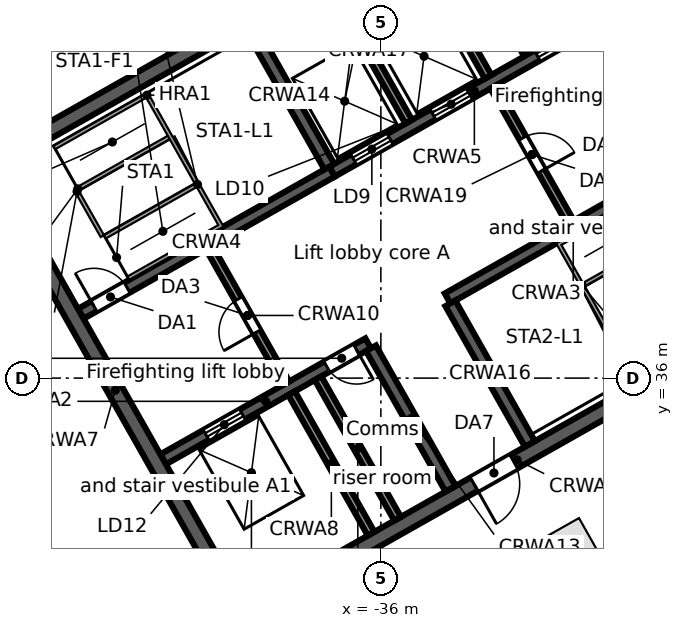
"""IFC4 building model, lengths in metres.
Left out: names, types, materials, properties, quantities, classifications, styles, units other than length and angle.
Written with IfcOpenShell. Run it as: python <this file> out.ifc"""

import sys

from ifc_helpers import new_model, si_unit, direction, frame, frame_2d, origin, origin_2d, place, context, subcontext, project, spatial, rectangle, extrude, element, fill, save


model = new_model("IFC4")
c1 = context("Model", 3, precision=1e-05, world=origin(), true_north=direction((0.0, 1.0)))
c2 = subcontext(c1, "Body", "Model", "MODEL_VIEW")
j1 = project(units=[si_unit("LENGTHUNIT", "METRE"), si_unit("PLANEANGLEUNIT", "RADIAN")], contexts=[c1])
p1 = place(None, origin())
s1 = spatial("IfcSite", under=j1, at=p1, CompositionType="ELEMENT")
p2 = place(p1, origin())
s2 = spatial("IfcBuilding", under=s1, at=p2, CompositionType="ELEMENT")
p3 = place(p2, frame((0.0, 0.0, 324.1)))
s3 = spatial("IfcBuildingStorey", under=s2, at=p3, CompositionType="ELEMENT", Elevation=324.1)
p4 = place(p3, frame((-30.976, 31.635, 0.0), z_axis=(0.0, 0.0, 1.0), x_axis=(0.87035569594, 0.492423560103, 0.0)))
e1 = element("IfcColumn", 1, at=p4, inside=s3, PredefinedType="COLUMN", context=c2, shape_type="SweptSolid", body=[
    extrude(rectangle(XDim=1.0, YDim=1.0, at=origin_2d()), origin(), (0.0, 0.0, 1.0), 3.8),
])
p5 = place(p3, frame((-44.115, 26.507, 0.0), z_axis=(0.0, 0.0, 1.0), x_axis=(-0.857166583633, 0.515039268311, 0.0)))
e2 = element("IfcWall", 2, at=p5, inside=s3, PredefinedType="STANDARD", context=c2, shape_type="SweptSolid", body=[
    extrude(rectangle(XDim=17.106, YDim=0.25, at=frame_2d((8.553, 0.0))), origin(), (0.0, 0.0, 1.0), 3.52),
])
p6 = place(p5, frame((14.417, 0.0, 0.8)))
e3 = element("IfcOpeningElement", 3, at=p6, cuts=e2, PredefinedType="OPENING", context=c2, shape_type="SweptSolid", body=[
    extrude(rectangle(XDim=2.4, YDim=2.2, at=frame_2d((1.2, 1.1))), frame((0.0, 0.135, 0.0), z_axis=(0.0, -1.0, 0.0), x_axis=(1.0, 0.0, 0.0)), (0.0, 0.0, 1.0), 0.27),
])
p7 = place(p5, frame((11.584, 0.0, 0.8)))
e4 = element("IfcOpeningElement", 4, at=p7, cuts=e2, PredefinedType="OPENING", context=c2, shape_type="SweptSolid", body=[
    extrude(rectangle(XDim=2.4, YDim=2.2, at=frame_2d((1.2, 1.1))), frame((0.0, 0.135, 0.0), z_axis=(0.0, -1.0, 0.0), x_axis=(1.0, 0.0, 0.0)), (0.0, 0.0, 1.0), 0.27),
])
p8 = place(p5, frame((8.75, 0.0, 0.8)))
e5 = element("IfcOpeningElement", 5, at=p8, cuts=e2, PredefinedType="OPENING", context=c2, shape_type="SweptSolid", body=[
    extrude(rectangle(XDim=2.4, YDim=2.2, at=frame_2d((1.2, 1.1))), frame((0.0, 0.135, 0.0), z_axis=(0.0, -1.0, 0.0), x_axis=(1.0, 0.0, 0.0)), (0.0, 0.0, 1.0), 0.27),
])
p9 = place(p5, frame((5.917, 0.0, 0.8)))
e6 = element("IfcOpeningElement", 6, at=p9, cuts=e2, PredefinedType="OPENING", context=c2, shape_type="SweptSolid", body=[
    extrude(rectangle(XDim=2.4, YDim=2.2, at=frame_2d((1.2, 1.1))), frame((0.0, 0.135, 0.0), z_axis=(0.0, -1.0, 0.0), x_axis=(1.0, 0.0, 0.0)), (0.0, 0.0, 1.0), 0.27),
])
p10 = place(p5, frame((3.084, 0.0, 0.8)))
e7 = element("IfcOpeningElement", 7, at=p10, cuts=e2, PredefinedType="OPENING", context=c2, shape_type="SweptSolid", body=[
    extrude(rectangle(XDim=2.4, YDim=2.2, at=frame_2d((1.2, 1.1))), frame((0.0, 0.135, 0.0), z_axis=(0.0, -1.0, 0.0), x_axis=(1.0, 0.0, 0.0)), (0.0, 0.0, 1.0), 0.27),
])
p11 = place(p5, frame((0.25, 0.0, 0.8)))
e8 = element("IfcOpeningElement", 8, at=p11, cuts=e2, PredefinedType="OPENING", context=c2, shape_type="SweptSolid", body=[
    extrude(rectangle(XDim=2.4, YDim=2.2, at=frame_2d((1.2, 1.1))), frame((0.0, 0.135, 0.0), z_axis=(0.0, -1.0, 0.0), x_axis=(1.0, 0.0, 0.0)), (0.0, 0.0, 1.0), 0.27),
])
p12 = place(p3, frame((-3.017, 46.293, 0.0), z_axis=(0.0, 0.0, 1.0), x_axis=(-0.870355474887, -0.492423950812, 0.0)))
e9 = element("IfcWall", 9, at=p12, inside=s3, PredefinedType="STANDARD", context=c2, shape_type="SweptSolid", body=[
    extrude(rectangle(XDim=40.34, YDim=0.25, at=frame_2d((20.17, 0.0))), origin(), (0.0, 0.0, 1.0), 3.52),
])
p13 = place(p12, frame((37.428, 0.0, 0.8)))
e10 = element("IfcOpeningElement", 10, at=p13, cuts=e9, PredefinedType="OPENING", context=c2, shape_type="SweptSolid", body=[
    extrude(rectangle(XDim=2.4, YDim=2.2, at=frame_2d((1.2, 1.1))), frame((0.0, 0.135, 0.0), z_axis=(0.0, -1.0, 0.0), x_axis=(1.0, 0.0, 0.0)), (0.0, 0.0, 1.0), 0.27),
])
p14 = place(p12, frame((34.372, 0.0, 0.0)))
e11 = element("IfcOpeningElement", 11, at=p14, cuts=e9, PredefinedType="OPENING", context=c2, shape_type="SweptSolid", body=[
    extrude(rectangle(XDim=1.8, YDim=2.4, at=frame_2d((0.9, 1.2))), frame((0.0, 0.135, 0.0), z_axis=(0.0, -1.0, 0.0), x_axis=(1.0, 0.0, 0.0)), (0.0, 0.0, 1.0), 0.27),
])
p15 = place(p12, frame((30.716, 0.0, 0.8)))
e12 = element("IfcOpeningElement", 12, at=p15, cuts=e9, PredefinedType="OPENING", context=c2, shape_type="SweptSolid", body=[
    extrude(rectangle(XDim=2.4, YDim=2.2, at=frame_2d((1.2, 1.1))), frame((0.0, 0.135, 0.0), z_axis=(0.0, -1.0, 0.0), x_axis=(1.0, 0.0, 0.0)), (0.0, 0.0, 1.0), 0.27),
])
p16 = place(p12, frame((27.36, 0.0, 0.8)))
e13 = element("IfcOpeningElement", 13, at=p16, cuts=e9, PredefinedType="OPENING", context=c2, shape_type="SweptSolid", body=[
    extrude(rectangle(XDim=2.4, YDim=2.2, at=frame_2d((1.2, 1.1))), frame((0.0, 0.135, 0.0), z_axis=(0.0, -1.0, 0.0), x_axis=(1.0, 0.0, 0.0)), (0.0, 0.0, 1.0), 0.27),
])
p17 = place(p12, frame((24.304, 0.0, 0.0)))
e14 = element("IfcOpeningElement", 14, at=p17, cuts=e9, PredefinedType="OPENING", context=c2, shape_type="SweptSolid", body=[
    extrude(rectangle(XDim=1.8, YDim=2.4, at=frame_2d((0.9, 1.2))), frame((0.0, 0.135, 0.0), z_axis=(0.0, -1.0, 0.0), x_axis=(1.0, 0.0, 0.0)), (0.0, 0.0, 1.0), 0.27),
])
p18 = place(p12, frame((20.648, 0.0, 0.8)))
e15 = element("IfcOpeningElement", 15, at=p18, cuts=e9, PredefinedType="OPENING", context=c2, shape_type="SweptSolid", body=[
    extrude(rectangle(XDim=2.4, YDim=2.2, at=frame_2d((1.2, 1.1))), frame((0.0, 0.135, 0.0), z_axis=(0.0, -1.0, 0.0), x_axis=(1.0, 0.0, 0.0)), (0.0, 0.0, 1.0), 0.27),
])
p19 = place(p12, frame((17.292, 0.0, 0.8)))
e16 = element("IfcOpeningElement", 16, at=p19, cuts=e9, PredefinedType="OPENING", context=c2, shape_type="SweptSolid", body=[
    extrude(rectangle(XDim=2.4, YDim=2.2, at=frame_2d((1.2, 1.1))), frame((0.0, 0.135, 0.0), z_axis=(0.0, -1.0, 0.0), x_axis=(1.0, 0.0, 0.0)), (0.0, 0.0, 1.0), 0.27),
])
p20 = place(p12, frame((14.236, 0.0, 0.0)))
e17 = element("IfcOpeningElement", 17, at=p20, cuts=e9, PredefinedType="OPENING", context=c2, shape_type="SweptSolid", body=[
    extrude(rectangle(XDim=1.8, YDim=2.4, at=frame_2d((0.9, 1.2))), frame((0.0, 0.135, 0.0), z_axis=(0.0, -1.0, 0.0), x_axis=(1.0, 0.0, 0.0)), (0.0, 0.0, 1.0), 0.27),
])
p21 = place(p12, frame((10.58, 0.0, 0.8)))
e18 = element("IfcOpeningElement", 18, at=p21, cuts=e9, PredefinedType="OPENING", context=c2, shape_type="SweptSolid", body=[
    extrude(rectangle(XDim=2.4, YDim=2.2, at=frame_2d((1.2, 1.1))), frame((0.0, 0.135, 0.0), z_axis=(0.0, -1.0, 0.0), x_axis=(1.0, 0.0, 0.0)), (0.0, 0.0, 1.0), 0.27),
])
p22 = place(p12, frame((7.224, 0.0, 0.8)))
e19 = element("IfcOpeningElement", 19, at=p22, cuts=e9, PredefinedType="OPENING", context=c2, shape_type="SweptSolid", body=[
    extrude(rectangle(XDim=2.4, YDim=2.2, at=frame_2d((1.2, 1.1))), frame((0.0, 0.135, 0.0), z_axis=(0.0, -1.0, 0.0), x_axis=(1.0, 0.0, 0.0)), (0.0, 0.0, 1.0), 0.27),
])
p23 = place(p12, frame((4.168, 0.0, 0.0)))
e20 = element("IfcOpeningElement", 20, at=p23, cuts=e9, PredefinedType="OPENING", context=c2, shape_type="SweptSolid", body=[
    extrude(rectangle(XDim=1.8, YDim=2.4, at=frame_2d((0.9, 1.2))), frame((0.0, 0.135, 0.0), z_axis=(0.0, -1.0, 0.0), x_axis=(1.0, 0.0, 0.0)), (0.0, 0.0, 1.0), 0.27),
])
p24 = place(p12, frame((0.512, 0.0, 0.8)))
e21 = element("IfcOpeningElement", 21, at=p24, cuts=e9, PredefinedType="OPENING", context=c2, shape_type="SweptSolid", body=[
    extrude(rectangle(XDim=2.4, YDim=2.2, at=frame_2d((1.2, 1.1))), frame((0.0, 0.135, 0.0), z_axis=(0.0, -1.0, 0.0), x_axis=(1.0, 0.0, 0.0)), (0.0, 0.0, 1.0), 0.27),
])
p25 = place(p3, frame((-39.813, 29.662, 0.0), z_axis=(0.0, 0.0, 1.0), x_axis=(0.870350116061, 0.492433422375, 0.0)))
e22 = element("IfcWall", 22, at=p25, inside=s3, PredefinedType="SOLIDWALL", context=c2, shape_type="SweptSolid", body=[
    extrude(rectangle(XDim=17.0, YDim=0.4, at=frame_2d((8.5, 0.0))), origin(), (0.0, 0.0, 1.0), 3.52),
])
p26 = place(p25, frame((7.2, 0.0, 0.0)))
e23 = element("IfcOpeningElement", 23, at=p26, cuts=e22, PredefinedType="OPENING", context=c2, shape_type="SweptSolid", body=[
    extrude(rectangle(XDim=1.2, YDim=2.1, at=frame_2d((0.6, 1.05))), frame((0.0, 0.21, 0.0), z_axis=(0.0, -1.0, 0.0), x_axis=(1.0, 0.0, 0.0)), (0.0, 0.0, 1.0), 0.42),
])
p27 = place(p3, frame((-41.73, 33.863, 0.0), z_axis=(0.0, 0.0, 1.0), x_axis=(0.870350800578, 0.492432212525, 0.0)))
e24 = element("IfcWall", 24, at=p27, inside=s3, PredefinedType="SOLIDWALL", context=c2, shape_type="SweptSolid", body=[
    extrude(rectangle(XDim=6.2, YDim=0.3, at=frame_2d((3.1, 0.0))), origin(), (0.0, 0.0, 1.0), 3.52),
])
p28 = place(p27, frame((1.3, 0.0, 0.0)))
e25 = element("IfcOpeningElement", 25, at=p28, cuts=e24, PredefinedType="OPENING", context=c2, shape_type="SweptSolid", body=[
    extrude(rectangle(XDim=1.1, YDim=2.1, at=frame_2d((0.55, 1.05))), frame((0.0, 0.16, 0.0), z_axis=(0.0, -1.0, 0.0), x_axis=(1.0, 0.0, 0.0)), (0.0, 0.0, 1.0), 0.32),
])
p29 = place(p27, frame((4.95, 0.0, 0.0)))
e26 = element("IfcOpeningElement", 26, at=p29, cuts=e24, PredefinedType="OPENING", context=c2, shape_type="SweptSolid", body=[
    extrude(rectangle(XDim=0.9, YDim=2.1, at=frame_2d((0.45, 1.05))), frame((0.0, 0.16, 0.0), z_axis=(0.0, -1.0, 0.0), x_axis=(1.0, 0.0, 0.0)), (0.0, 0.0, 1.0), 0.32),
])
p30 = place(p3, frame((-34.245, 38.097, 0.0), z_axis=(0.0, 0.0, 1.0), x_axis=(0.870356351998, 0.492422400523, 0.0)))
e27 = element("IfcWall", 27, at=p30, inside=s3, PredefinedType="SOLIDWALL", context=c2, shape_type="SweptSolid", body=[
    extrude(rectangle(XDim=7.6, YDim=0.3, at=frame_2d((3.8, 0.0))), origin(), (0.0, 0.0, 1.0), 3.52),
])
p31 = place(p30, frame((6.2, 0.0, 0.0)))
e28 = element("IfcOpeningElement", 28, at=p31, cuts=e27, PredefinedType="OPENING", context=c2, shape_type="SweptSolid", body=[
    extrude(rectangle(XDim=1.0, YDim=2.1, at=frame_2d((0.5, 1.05))), frame((0.0, 0.16, 0.0), z_axis=(0.0, -1.0, 0.0), x_axis=(1.0, 0.0, 0.0)), (0.0, 0.0, 1.0), 0.32),
])
p32 = place(p3, frame((-43.897, 37.692, 0.0), z_axis=(0.0, 0.0, 1.0), x_axis=(0.870356351998, 0.492422400523, 0.0)))
e29 = element("IfcWall", 29, at=p32, inside=s3, PredefinedType="SOLIDWALL", context=c2, shape_type="SweptSolid", body=[
    extrude(rectangle(XDim=7.6, YDim=0.3, at=frame_2d((3.8, 0.0))), origin(), (0.0, 0.0, 1.0), 3.52),
])
p33 = place(p32, frame((0.4, 0.0, 0.0)))
e30 = element("IfcOpeningElement", 30, at=p33, cuts=e29, PredefinedType="OPENING", context=c2, shape_type="SweptSolid", body=[
    extrude(rectangle(XDim=1.0, YDim=2.1, at=frame_2d((0.5, 1.05))), frame((0.0, 0.16, 0.0), z_axis=(0.0, -1.0, 0.0), x_axis=(1.0, 0.0, 0.0)), (0.0, 0.0, 1.0), 0.32),
])
p34 = place(p3, frame((-37.282, 41.435, 0.0), z_axis=(0.0, 0.0, 1.0), x_axis=(0.870361315115, 0.492413628113, 0.0)))
e31 = element("IfcWall", 31, at=p34, inside=s3, PredefinedType="SOLIDWALL", context=c2, shape_type="SweptSolid", body=[
    extrude(rectangle(XDim=8.6, YDim=0.3, at=frame_2d((4.3, 0.0))), origin(), (0.0, 0.0, 1.0), 3.52),
])
p35 = place(p34, frame((0.65, 0.0, 0.0)))
e32 = element("IfcOpeningElement", 32, at=p35, cuts=e31, PredefinedType="OPENING", context=c2, shape_type="SweptSolid", body=[
    extrude(rectangle(XDim=1.1, YDim=2.1, at=frame_2d((0.55, 1.05))), frame((0.0, 0.16, 0.0), z_axis=(0.0, -1.0, 0.0), x_axis=(1.0, 0.0, 0.0)), (0.0, 0.0, 1.0), 0.32),
])
p36 = place(p34, frame((3.05, 0.0, 0.0)))
e33 = element("IfcOpeningElement", 33, at=p36, cuts=e31, PredefinedType="OPENING", context=c2, shape_type="SweptSolid", body=[
    extrude(rectangle(XDim=1.1, YDim=2.1, at=frame_2d((0.55, 1.05))), frame((0.0, 0.16, 0.0), z_axis=(0.0, -1.0, 0.0), x_axis=(1.0, 0.0, 0.0)), (0.0, 0.0, 1.0), 0.32),
])
p37 = place(p34, frame((6.2, 0.0, 0.0)))
e34 = element("IfcOpeningElement", 34, at=p37, cuts=e31, PredefinedType="OPENING", context=c2, shape_type="SweptSolid", body=[
    extrude(rectangle(XDim=1.1, YDim=2.1, at=frame_2d((0.55, 1.05))), frame((0.0, 0.16, 0.0), z_axis=(0.0, -1.0, 0.0), x_axis=(1.0, 0.0, 0.0)), (0.0, 0.0, 1.0), 0.32),
])
p38 = place(p3, frame((-46.51, 41.499, 0.0), z_axis=(0.0, 0.0, 1.0), x_axis=(0.870356271124, 0.492422543467, 0.0)))
e35 = element("IfcWall", 35, at=p38, inside=s3, PredefinedType="SOLIDWALL", context=c2, shape_type="SweptSolid", body=[
    extrude(rectangle(XDim=17.0, YDim=0.4, at=frame_2d((8.5, 0.0))), origin(), (0.0, 0.0, 1.0), 3.52),
])
p39 = place(p3, frame((-46.238, 41.423, 0.0), z_axis=(0.0, 0.0, 1.0), x_axis=(0.492421663121, -0.870356769198, 0.0)))
e36 = element("IfcWall", 36, at=p39, inside=s3, PredefinedType="SOLIDWALL", context=c2, shape_type="SweptSolid", body=[
    extrude(rectangle(XDim=13.2, YDim=0.4, at=frame_2d((6.6, 0.0))), origin(), (0.0, 0.0, 1.0), 3.52),
])
p40 = place(p3, frame((-38.349, 35.603, 0.0), z_axis=(0.0, 0.0, 1.0), x_axis=(0.492397924348, -0.870370199454, 0.0)))
e37 = element("IfcWall", 37, at=p40, inside=s3, PredefinedType="SOLIDWALL", context=c2, shape_type="SweptSolid", body=[
    extrude(rectangle(XDim=4.25, YDim=0.2, at=frame_2d((2.125, 0.0))), origin(), (0.0, 0.0, 1.0), 3.52),
])
p41 = place(p3, frame((-40.516, 39.433, 0.0), z_axis=(0.0, 0.0, 1.0), x_axis=(0.492453559952, -0.87033872216, 0.0)))
e38 = element("IfcWall", 38, at=p41, inside=s3, PredefinedType="PARTITIONING", context=c2, shape_type="SweptSolid", body=[
    extrude(rectangle(XDim=4.1, YDim=0.2, at=frame_2d((2.05, 0.0))), origin(), (0.0, 0.0, 1.0), 3.52),
])
p42 = place(p41, frame((1.55, 0.0, 0.0)))
e39 = element("IfcOpeningElement", 39, at=p42, cuts=e38, PredefinedType="OPENING", context=c2, shape_type="SweptSolid", body=[
    extrude(rectangle(XDim=1.0, YDim=2.1, at=frame_2d((0.5, 1.05))), frame((0.0, 0.11, 0.0), z_axis=(0.0, -1.0, 0.0), x_axis=(1.0, 0.0, 0.0)), (0.0, 0.0, 1.0), 0.22),
])
p43 = place(p3, frame((-37.653, 35.997, 0.0), z_axis=(0.0, 0.0, 1.0), x_axis=(0.492422543467, -0.870356271124, 0.0)))
e40 = element("IfcWall", 40, at=p43, inside=s3, PredefinedType="SOLIDWALL", context=c2, shape_type="SweptSolid", body=[
    extrude(rectangle(XDim=4.25, YDim=0.2, at=frame_2d((2.125, 0.0))), origin(), (0.0, 0.0, 1.0), 3.52),
])
for number, where, z_axis, x_axis in (
    (41, (-36.26, 36.785, 0.0), (0.0, 0.0, 1.0), (0.492, -0.87, 0.0)),
    (42, (-39.449, 45.264, 0.0), (0.0, 0.0, 1.0), (0.492, -0.87, 0.0)),
    (43, (-34.171, 37.967, 0.0), (0.0, 0.0, 1.0), (0.492, -0.87, 0.0)),
):
    element("IfcWall", number, at=place(p3, frame(where, z_axis=z_axis, x_axis=x_axis)), inside=s3, PredefinedType="SOLIDWALL", context=c2, shape_type="SweptSolid", body=[
        extrude(rectangle(XDim=4.25, YDim=0.3, at=frame_2d((2.125, 0.0))), origin(), (0.0, 0.0, 1.0), 3.52),
    ])
p44 = place(p3, frame((-37.36, 46.446, 0.0), z_axis=(0.0, 0.0, 1.0), x_axis=(0.492422543467, -0.870356271124, 0.0)))
e44 = element("IfcWall", 44, at=p44, inside=s3, PredefinedType="SOLIDWALL", context=c2, shape_type="SweptSolid", body=[
    extrude(rectangle(XDim=4.25, YDim=0.2, at=frame_2d((2.125, 0.0))), origin(), (0.0, 0.0, 1.0), 3.52),
])
p45 = place(p3, frame((-33.031, 43.667, 0.0), z_axis=(0.0, 0.0, 1.0), x_axis=(0.492408451753, -0.87036424366, 0.0)))
e45 = element("IfcWall", 45, at=p45, inside=s3, PredefinedType="PARTITIONING", context=c2, shape_type="SweptSolid", body=[
    extrude(rectangle(XDim=4.1, YDim=0.2, at=frame_2d((2.05, 0.0))), origin(), (0.0, 0.0, 1.0), 3.52),
])
p46 = place(p45, frame((1.55, 0.0, 0.0)))
e46 = element("IfcOpeningElement", 46, at=p46, cuts=e45, PredefinedType="OPENING", context=c2, shape_type="SweptSolid", body=[
    extrude(rectangle(XDim=1.0, YDim=2.1, at=frame_2d((0.5, 1.05))), frame((0.0, 0.11, 0.0), z_axis=(0.0, -1.0, 0.0), x_axis=(1.0, 0.0, 0.0)), (0.0, 0.0, 1.0), 0.22),
])
p47 = place(p3, frame((-35.271, 47.628, 0.0), z_axis=(0.0, 0.0, 1.0), x_axis=(0.492422543467, -0.870356271124, 0.0)))
e47 = element("IfcWall", 47, at=p47, inside=s3, PredefinedType="SOLIDWALL", context=c2, shape_type="SweptSolid", body=[
    extrude(rectangle(XDim=4.25, YDim=0.2, at=frame_2d((2.125, 0.0))), origin(), (0.0, 0.0, 1.0), 3.52),
])
p48 = place(p3, frame((-31.79, 49.597, 0.0), z_axis=(0.0, 0.0, 1.0), x_axis=(0.492421663121, -0.870356769198, 0.0)))
e48 = element("IfcWall", 48, at=p48, inside=s3, PredefinedType="SOLIDWALL", context=c2, shape_type="SweptSolid", body=[
    extrude(rectangle(XDim=13.2, YDim=0.4, at=frame_2d((6.6, 0.0))), origin(), (0.0, 0.0, 1.0), 3.52),
])
p49 = place(p35, origin())
e49 = element("IfcDoor", 49, at=p49, inside=s3, OperationType="DOUBLE_DOOR_SLIDING", PredefinedType="DOOR", context=c2, shape_type="SweptSolid", body=[
    extrude(rectangle(XDim=1.1, YDim=2.1, at=frame_2d((0.55, 1.05))), frame((0.0, 0.025, 0.0), z_axis=(0.0, -1.0, 0.0), x_axis=(1.0, 0.0, 0.0)), (0.0, 0.0, 1.0), 0.05),
])
fill(e32, e49)
p50 = place(p36, origin())
e50 = element("IfcDoor", 50, at=p50, inside=s3, OperationType="DOUBLE_DOOR_SLIDING", PredefinedType="DOOR", context=c2, shape_type="SweptSolid", body=[
    extrude(rectangle(XDim=1.1, YDim=2.1, at=frame_2d((0.55, 1.05))), frame((0.0, 0.025, 0.0), z_axis=(0.0, -1.0, 0.0), x_axis=(1.0, 0.0, 0.0)), (0.0, 0.0, 1.0), 0.05),
])
fill(e33, e50)
p51 = place(p37, origin())
e51 = element("IfcDoor", 51, at=p51, inside=s3, OperationType="DOUBLE_DOOR_SLIDING", PredefinedType="DOOR", context=c2, shape_type="SweptSolid", body=[
    extrude(rectangle(XDim=1.1, YDim=2.1, at=frame_2d((0.55, 1.05))), frame((0.0, 0.025, 0.0), z_axis=(0.0, -1.0, 0.0), x_axis=(1.0, 0.0, 0.0)), (0.0, 0.0, 1.0), 0.05),
])
fill(e34, e51)
p52 = place(p28, origin())
e52 = element("IfcDoor", 52, at=p52, inside=s3, OperationType="DOUBLE_DOOR_SLIDING", PredefinedType="DOOR", context=c2, shape_type="SweptSolid", body=[
    extrude(rectangle(XDim=1.1, YDim=2.1, at=frame_2d((0.55, 1.05))), frame((0.0, 0.025, 0.0), z_axis=(0.0, -1.0, 0.0), x_axis=(1.0, 0.0, 0.0)), (0.0, 0.0, 1.0), 0.05),
])
fill(e25, e52)
p53 = place(p33, origin())
e53 = element("IfcDoor", 53, at=p53, inside=s3, OperationType="SINGLE_SWING_LEFT", PredefinedType="DOOR", context=c2, shape_type="SweptSolid", body=[
    extrude(rectangle(XDim=1.0, YDim=2.1, at=frame_2d((0.5, 1.05))), frame((0.0, 0.025, 0.0), z_axis=(0.0, -1.0, 0.0), x_axis=(1.0, 0.0, 0.0)), (0.0, 0.0, 1.0), 0.05),
])
fill(e30, e53)
p54 = place(p42, frame((1.0, 0.0, 0.0), z_axis=(0.0, 0.0, 1.0), x_axis=(-1.0, 0.0, 0.0)))
e54 = element("IfcDoor", 54, at=p54, inside=s3, OperationType="SINGLE_SWING_LEFT", PredefinedType="DOOR", context=c2, shape_type="SweptSolid", body=[
    extrude(rectangle(XDim=1.0, YDim=2.1, at=frame_2d((0.5, 1.05))), frame((0.0, 0.025, 0.0), z_axis=(0.0, -1.0, 0.0), x_axis=(1.0, 0.0, 0.0)), (0.0, 0.0, 1.0), 0.05),
])
fill(e39, e54)
p55 = place(p46, origin())
e55 = element("IfcDoor", 55, at=p55, inside=s3, OperationType="SINGLE_SWING_RIGHT", PredefinedType="DOOR", context=c2, shape_type="SweptSolid", body=[
    extrude(rectangle(XDim=1.0, YDim=2.1, at=frame_2d((0.5, 1.05))), frame((0.0, 0.025, 0.0), z_axis=(0.0, -1.0, 0.0), x_axis=(1.0, 0.0, 0.0)), (0.0, 0.0, 1.0), 0.05),
])
fill(e46, e55)
p56 = place(p26, frame((1.2, 0.0, 0.0), z_axis=(0.0, 0.0, 1.0), x_axis=(-1.0, 0.0, 0.0)))
e56 = element("IfcDoor", 56, at=p56, inside=s3, OperationType="SINGLE_SWING_RIGHT", PredefinedType="DOOR", context=c2, shape_type="SweptSolid", body=[
    extrude(rectangle(XDim=1.2, YDim=2.1, at=frame_2d((0.6, 1.05))), frame((0.0, 0.025, 0.0), z_axis=(0.0, -1.0, 0.0), x_axis=(1.0, 0.0, 0.0)), (0.0, 0.0, 1.0), 0.05),
])
fill(e23, e56)
p57 = place(p29, frame((0.9, 0.0, 0.0), z_axis=(0.0, 0.0, 1.0), x_axis=(-1.0, 0.0, 0.0)))
e57 = element("IfcDoor", 57, at=p57, inside=s3, OperationType="SINGLE_SWING_LEFT", PredefinedType="DOOR", context=c2, shape_type="SweptSolid", body=[
    extrude(rectangle(XDim=0.9, YDim=2.1, at=frame_2d((0.45, 1.05))), frame((0.0, 0.025, 0.0), z_axis=(0.0, -1.0, 0.0), x_axis=(1.0, 0.0, 0.0)), (0.0, 0.0, 1.0), 0.05),
])
fill(e26, e57)
save(model, sys.argv[1])
